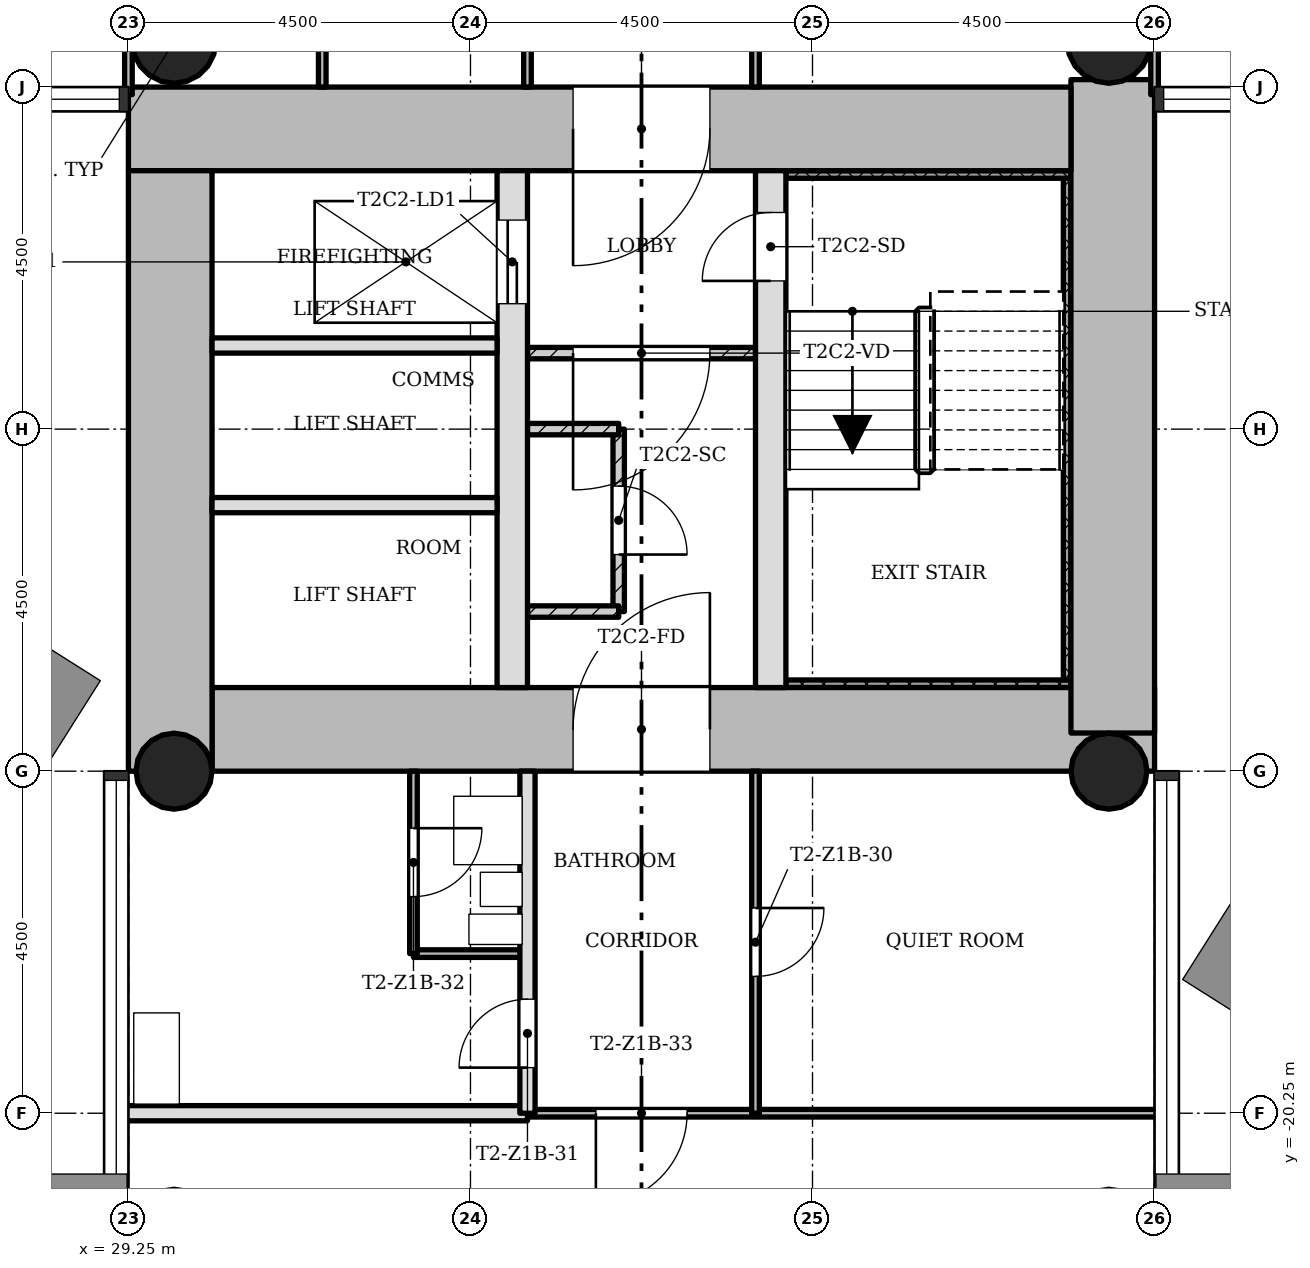
"""IFC4 building model, lengths in metres.
Left out: names, types, materials, properties, quantities, classifications, styles, units other than length and angle.
Written with IfcOpenShell. Run it as: python <this file> out.ifc"""

import sys

from ifc_helpers import new_model, si_unit, direction, frame, frame_2d, origin, origin_2d, place, context, subcontext, project, spatial, rectangle, hollow_circle, extrude, element, fill, save


model = new_model("IFC4")
c1 = context("Model", 3, precision=1e-05, world=origin(), true_north=direction((0.0, 1.0)))
c2 = subcontext(c1, "Body", "Model", "MODEL_VIEW")
j1 = project(units=[si_unit("LENGTHUNIT", "METRE"), si_unit("PLANEANGLEUNIT", "RADIAN")], contexts=[c1])
p1 = place(None, origin())
s1 = spatial("IfcSite", under=j1, at=p1, CompositionType="ELEMENT")
p2 = place(p1, origin())
s2 = spatial("IfcBuilding", under=s1, at=p2, CompositionType="ELEMENT")
p3 = place(p2, frame((0.0, 0.0, 38.1)))
s3 = spatial("IfcBuildingStorey", under=s2, at=p3, CompositionType="ELEMENT", Elevation=38.1)
p4 = place(p3, frame((30.35, -15.2, 0.0), z_axis=(0.0, 0.0, 1.0), x_axis=(1.0, 0.0, 0.0)))
e1 = element("IfcWall", 1, at=p4, inside=s3, PredefinedType="SHEAR", context=c2, shape_type="SweptSolid", body=[
    extrude(rectangle(XDim=12.4, YDim=1.1, at=frame_2d((6.2, 0.0))), origin(), (0.0, 0.0, 1.0), 3.4),
])
p5 = place(p4, frame((4.75, 0.0, 0.0)))
e2 = element("IfcOpeningElement", 2, at=p5, cuts=e1, PredefinedType="OPENING", context=c2, shape_type="SweptSolid", body=[
    extrude(rectangle(XDim=1.8, YDim=2.1, at=frame_2d((0.9, 1.05))), frame((0.0, 0.56, 0.0), z_axis=(0.0, -1.0, 0.0), x_axis=(1.0, 0.0, 0.0)), (0.0, 0.0, 1.0), 1.12),
])
p6 = place(p3, frame((42.2, -15.248, 0.0), z_axis=(0.0, 0.0, 1.0), x_axis=(0.0, 1.0, 0.0)))
e3 = element("IfcWall", 3, at=p6, inside=s3, PredefinedType="SHEAR", context=c2, shape_type="SweptSolid", body=[
    extrude(rectangle(XDim=8.596, YDim=1.1, at=frame_2d((4.298, 0.0))), origin(), (0.0, 0.0, 1.0), 3.4),
])
p7 = place(p3, frame((41.65, -7.3, 0.0), z_axis=(0.0, 0.0, 1.0), x_axis=(-1.0, 0.0, 0.0)))
e4 = element("IfcWall", 4, at=p7, inside=s3, PredefinedType="SHEAR", context=c2, shape_type="SweptSolid", body=[
    extrude(rectangle(XDim=12.4, YDim=1.1, at=frame_2d((6.2, 0.0))), origin(), (0.0, 0.0, 1.0), 3.4),
])
p8 = place(p7, frame((4.75, 0.0, 0.0)))
e5 = element("IfcOpeningElement", 5, at=p8, cuts=e4, PredefinedType="OPENING", context=c2, shape_type="SweptSolid", body=[
    extrude(rectangle(XDim=1.8, YDim=2.1, at=frame_2d((0.9, 1.05))), frame((0.0, 0.56, 0.0), z_axis=(0.0, -1.0, 0.0), x_axis=(1.0, 0.0, 0.0)), (0.0, 0.0, 1.0), 1.12),
])
p9 = place(p3, frame((29.8, -7.85, 0.0), z_axis=(0.0, 0.0, 1.0), x_axis=(0.0, -1.0, 0.0)))
e6 = element("IfcWall", 6, at=p9, inside=s3, PredefinedType="SHEAR", context=c2, shape_type="SweptSolid", body=[
    extrude(rectangle(XDim=7.9, YDim=1.1, at=frame_2d((3.95, 0.0))), origin(), (0.0, 0.0, 1.0), 3.4),
])
p10 = place(p3, frame((34.3, -14.65, 0.0), z_axis=(0.0, 0.0, 1.0), x_axis=(0.0, 1.0, 0.0)))
e7 = element("IfcWall", 7, at=p10, inside=s3, PredefinedType="SHEAR", context=c2, shape_type="SweptSolid", body=[
    extrude(rectangle(XDim=6.8, YDim=0.4, at=frame_2d((3.4, 0.0))), origin(), (0.0, 0.0, 1.0), 3.4),
])
p11 = place(p10, frame((5.05, 0.0, 0.0)))
e8 = element("IfcOpeningElement", 8, at=p11, cuts=e7, PredefinedType="OPENING", context=c2, shape_type="SweptSolid", body=[
    extrude(rectangle(XDim=1.1, YDim=2.1, at=frame_2d((0.55, 1.05))), frame((0.0, 0.21, 0.0), z_axis=(0.0, -1.0, 0.0), x_axis=(1.0, 0.0, 0.0)), (0.0, 0.0, 1.0), 0.42),
])
p12 = place(p3, frame((37.7, -14.65, 0.0), z_axis=(0.0, 0.0, 1.0), x_axis=(0.0, 1.0, 0.0)))
e9 = element("IfcWall", 9, at=p12, inside=s3, PredefinedType="SHEAR", context=c2, shape_type="SweptSolid", body=[
    extrude(rectangle(XDim=6.8, YDim=0.4, at=frame_2d((3.4, 0.0))), origin(), (0.0, 0.0, 1.0), 3.4),
])
p13 = place(p12, frame((5.35, 0.0, 0.0)))
e10 = element("IfcOpeningElement", 10, at=p13, cuts=e9, PredefinedType="OPENING", context=c2, shape_type="SweptSolid", body=[
    extrude(rectangle(XDim=0.9, YDim=2.1, at=frame_2d((0.45, 1.05))), frame((0.0, 0.21, 0.0), z_axis=(0.0, -1.0, 0.0), x_axis=(1.0, 0.0, 0.0)), (0.0, 0.0, 1.0), 0.42),
])
for number, where, z_axis, x_axis in (
    (11, (42.15, -15.75, 0.0), (0.0, 0.0, 1.0), (1.0, 0.0, 0.0)),
    (12, (29.85, -15.75, 0.0), (0.0, 0.0, 1.0), (1.0, 0.0, 0.0)),
):
    element("IfcColumn", number, at=place(p3, frame(where, z_axis=z_axis, x_axis=x_axis)), inside=s3, PredefinedType="COLUMN", context=c2, shape_type="SweptSolid", body=[
        extrude(hollow_circle(Radius=0.5, WallThickness=0.036, at=origin_2d()), origin(), (0.0, 0.0, 1.0), 3.4),
    ])
for number, where, z_axis, x_axis in (
    (13, (42.15, -6.15, 0.0), (0.0, 0.0, 1.0), (1.0, 0.0, 0.0)),
    (14, (29.85, -6.15, 0.0), (0.0, 0.0, 1.0), (1.0, 0.0, 0.0)),
):
    element("IfcColumn", number, at=place(p3, frame(where, z_axis=z_axis, x_axis=x_axis)), inside=s3, PredefinedType="COLUMN", context=c2, shape_type="SweptSolid", body=[
        extrude(hollow_circle(Radius=0.55, WallThickness=0.04, at=origin_2d()), origin(), (0.0, 0.0, 1.0), 3.4),
    ])
p14 = place(p3, frame((34.5, -10.25, 0.0), z_axis=(0.0, 0.0, 1.0), x_axis=(1.0, 0.0, 0.0)))
e15 = element("IfcWall", 15, at=p14, inside=s3, PredefinedType="PARTITIONING", context=c2, shape_type="SweptSolid", body=[
    extrude(rectangle(XDim=3.0, YDim=0.15, at=frame_2d((1.5, 0.0))), origin(), (0.0, 0.0, 1.0), 3.0),
])
p15 = place(p14, frame((0.6, 0.0, 0.0)))
e16 = element("IfcOpeningElement", 16, at=p15, cuts=e15, PredefinedType="OPENING", context=c2, shape_type="SweptSolid", body=[
    extrude(rectangle(XDim=1.8, YDim=2.1, at=frame_2d((0.9, 1.05))), frame((0.0, 0.085, 0.0), z_axis=(0.0, -1.0, 0.0), x_axis=(1.0, 0.0, 0.0)), (0.0, 0.0, 1.0), 0.17),
])
for number, where, z_axis, x_axis in (
    (17, (30.35, -10.15, 0.0), (0.0, 0.0, 1.0), (1.0, 0.0, 0.0)),
    (18, (30.35, -12.25, 0.0), (0.0, 0.0, 1.0), (1.0, 0.0, 0.0)),
):
    element("IfcWall", number, at=place(p3, frame(where, z_axis=z_axis, x_axis=x_axis)), inside=s3, PredefinedType="SOLIDWALL", context=c2, shape_type="SweptSolid", body=[
        extrude(rectangle(XDim=3.75, YDim=0.2, at=frame_2d((1.875, 0.0))), origin(), (0.0, 0.0, 1.0), 3.0),
    ])
p16 = place(p3, frame((35.7, -11.25, 0.0), z_axis=(0.0, 0.0, 1.0), x_axis=(0.0, -1.0, 0.0)))
e19 = element("IfcWall", 19, at=p16, inside=s3, PredefinedType="PARTITIONING", context=c2, shape_type="SweptSolid", body=[
    extrude(rectangle(XDim=2.4, YDim=0.15, at=frame_2d((1.2, 0.0))), origin(), (0.0, 0.0, 1.0), 3.0),
])
p17 = place(p16, frame((0.75, 0.0, 0.0)))
e20 = element("IfcOpeningElement", 20, at=p17, cuts=e19, PredefinedType="OPENING", context=c2, shape_type="SweptSolid", body=[
    extrude(rectangle(XDim=0.9, YDim=2.1, at=frame_2d((0.45, 1.05))), frame((0.0, 0.085, 0.0), z_axis=(0.0, -1.0, 0.0), x_axis=(1.0, 0.0, 0.0)), (0.0, 0.0, 1.0), 0.17),
])
for number, where, z_axis, x_axis in (
    (21, (35.7, -11.25, 0.0), (0.0, 0.0, 1.0), (-1.0, 0.0, 0.0)),
    (22, (35.7, -13.65, 0.0), (0.0, 0.0, 1.0), (-1.0, 0.0, 0.0)),
):
    element("IfcWall", number, at=place(p3, frame(where, z_axis=z_axis, x_axis=x_axis)), inside=s3, PredefinedType="PARTITIONING", context=c2, shape_type="SweptSolid", body=[
        extrude(rectangle(XDim=1.2, YDim=0.15, at=frame_2d((0.6, 0.0))), origin(), (0.0, 0.0, 1.0), 3.0),
    ])
p18 = place(p3, frame((42.85, -20.25, 0.0), z_axis=(0.0, 0.0, 1.0), x_axis=(-1.0, 0.0, 0.0)))
e23 = element("IfcWall", 23, at=p18, inside=s3, PredefinedType="PARTITIONING", context=c2, shape_type="SweptSolid", body=[
    extrude(rectangle(XDim=8.35, YDim=0.1, at=frame_2d((4.175, 0.0))), origin(), (0.0, 0.0, 1.0), 3.0),
])
p19 = place(p18, frame((6.25, 0.0, 0.0)))
e24 = element("IfcOpeningElement", 24, at=p19, cuts=e23, PredefinedType="OPENING", context=c2, shape_type="SweptSolid", body=[
    extrude(rectangle(XDim=1.2, YDim=2.1, at=frame_2d((0.6, 1.05))), frame((0.0, 0.06, 0.0), z_axis=(0.0, -1.0, 0.0), x_axis=(1.0, 0.0, 0.0)), (0.0, 0.0, 1.0), 0.12),
])
p20 = place(p3, frame((34.5, -20.25, 0.0), z_axis=(0.0, 0.0, 1.0), x_axis=(-1.0, 0.0, 0.0)))
e25 = element("IfcWall", 25, at=p20, inside=s3, PredefinedType="SOLIDWALL", context=c2, shape_type="SweptSolid", body=[
    extrude(rectangle(XDim=5.35, YDim=0.2, at=frame_2d((2.675, 0.0))), origin(), (0.0, 0.0, 1.0), 3.0),
])
p21 = place(p3, frame((34.5, -18.15, 0.0), z_axis=(0.0, 0.0, 1.0), x_axis=(-1.0, 0.0, 0.0)))
e26 = element("IfcWall", 26, at=p21, inside=s3, PredefinedType="PARTITIONING", context=c2, shape_type="SweptSolid", body=[
    extrude(rectangle(XDim=1.5, YDim=0.1, at=frame_2d((0.75, 0.0))), origin(), (0.0, 0.0, 1.0), 3.0),
])
p22 = place(p3, frame((42.75, -6.85, 0.0), z_axis=(0.0, 0.0, 1.0), x_axis=(0.0, 1.0, 0.0)))
e27 = element("IfcWall", 27, at=p22, inside=s3, PredefinedType="PARTITIONING", context=c2, shape_type="SweptSolid", body=[
    extrude(rectangle(XDim=5.95, YDim=0.1, at=frame_2d((2.975, 0.0))), origin(), (0.0, 0.0, 1.0), 3.0),
])
p23 = place(p3, frame((37.5, -20.25, 0.0), z_axis=(0.0, 0.0, 1.0), x_axis=(0.0, 1.0, 0.0)))
e28 = element("IfcWall", 28, at=p23, inside=s3, PredefinedType="PARTITIONING", context=c2, shape_type="SweptSolid", body=[
    extrude(rectangle(XDim=4.5, YDim=0.1, at=frame_2d((2.25, 0.0))), origin(), (0.0, 0.0, 1.0), 3.0),
])
p24 = place(p23, frame((1.8, 0.0, 0.0)))
e29 = element("IfcOpeningElement", 29, at=p24, cuts=e28, PredefinedType="OPENING", context=c2, shape_type="SweptSolid", body=[
    extrude(rectangle(XDim=0.9, YDim=2.1, at=frame_2d((0.45, 1.05))), frame((0.0, 0.06, 0.0), z_axis=(0.0, -1.0, 0.0), x_axis=(1.0, 0.0, 0.0)), (0.0, 0.0, 1.0), 0.12),
])
p25 = place(p3, frame((37.5, -6.75, 0.0), z_axis=(0.0, 0.0, 1.0), x_axis=(0.0, 1.0, 0.0)))
e30 = element("IfcWall", 30, at=p25, inside=s3, PredefinedType="PARTITIONING", context=c2, shape_type="SweptSolid", body=[
    extrude(rectangle(XDim=5.85, YDim=0.1, at=frame_2d((2.925, 0.0))), origin(), (0.0, 0.0, 1.0), 3.0),
])
p26 = place(p25, frame((1.575, 0.0, 0.0)))
e31 = element("IfcOpeningElement", 31, at=p26, cuts=e30, PredefinedType="OPENING", context=c2, shape_type="SweptSolid", body=[
    extrude(rectangle(XDim=0.9, YDim=2.1, at=frame_2d((0.45, 1.05))), frame((0.0, 0.06, 0.0), z_axis=(0.0, -1.0, 0.0), x_axis=(1.0, 0.0, 0.0)), (0.0, 0.0, 1.0), 0.12),
])
p27 = place(p3, frame((34.5, -6.75, 0.0), z_axis=(0.0, 0.0, 1.0), x_axis=(0.0, 1.0, 0.0)))
e32 = element("IfcWall", 32, at=p27, inside=s3, PredefinedType="PARTITIONING", context=c2, shape_type="SweptSolid", body=[
    extrude(rectangle(XDim=5.85, YDim=0.1, at=frame_2d((2.925, 0.0))), origin(), (0.0, 0.0, 1.0), 3.0),
])
p28 = place(p27, frame((2.475, 0.0, 0.0)))
e33 = element("IfcOpeningElement", 33, at=p28, cuts=e32, PredefinedType="OPENING", context=c2, shape_type="SweptSolid", body=[
    extrude(rectangle(XDim=0.9, YDim=2.1, at=frame_2d((0.45, 1.05))), frame((0.0, 0.06, 0.0), z_axis=(0.0, -1.0, 0.0), x_axis=(1.0, 0.0, 0.0)), (0.0, 0.0, 1.0), 0.12),
])
p29 = place(p3, frame((34.5, -20.25, 0.0), z_axis=(0.0, 0.0, 1.0), x_axis=(0.0, 1.0, 0.0)))
e34 = element("IfcWall", 34, at=p29, inside=s3, PredefinedType="SOLIDWALL", context=c2, shape_type="SweptSolid", body=[
    extrude(rectangle(XDim=4.5, YDim=0.2, at=frame_2d((2.25, 0.0))), origin(), (0.0, 0.0, 1.0), 3.0),
])
p30 = place(p29, frame((0.6, 0.0, 0.0)))
e35 = element("IfcOpeningElement", 35, at=p30, cuts=e34, PredefinedType="OPENING", context=c2, shape_type="SweptSolid", body=[
    extrude(rectangle(XDim=0.9, YDim=2.1, at=frame_2d((0.45, 1.05))), frame((0.0, 0.11, 0.0), z_axis=(0.0, -1.0, 0.0), x_axis=(1.0, 0.0, 0.0)), (0.0, 0.0, 1.0), 0.22),
])
p31 = place(p3, frame((33.0, -18.15, 0.0), z_axis=(0.0, 0.0, 1.0), x_axis=(0.0, 1.0, 0.0)))
e36 = element("IfcWall", 36, at=p31, inside=s3, PredefinedType="PARTITIONING", context=c2, shape_type="SweptSolid", body=[
    extrude(rectangle(XDim=2.4, YDim=0.1, at=frame_2d((1.2, 0.0))), origin(), (0.0, 0.0, 1.0), 3.0),
])
p32 = place(p31, frame((0.75, 0.0, 0.0)))
e37 = element("IfcOpeningElement", 37, at=p32, cuts=e36, PredefinedType="OPENING", context=c2, shape_type="SweptSolid", body=[
    extrude(rectangle(XDim=0.9, YDim=2.1, at=frame_2d((0.45, 1.05))), frame((0.0, 0.06, 0.0), z_axis=(0.0, -1.0, 0.0), x_axis=(1.0, 0.0, 0.0)), (0.0, 0.0, 1.0), 0.12),
])
p33 = place(p3, frame((31.8, -6.75, 0.0), z_axis=(0.0, 0.0, 1.0), x_axis=(0.0, 1.0, 0.0)))
e38 = element("IfcWall", 38, at=p33, inside=s3, PredefinedType="PARTITIONING", context=c2, shape_type="SweptSolid", body=[
    extrude(rectangle(XDim=5.85, YDim=0.1, at=frame_2d((2.925, 0.0))), origin(), (0.0, 0.0, 1.0), 3.0),
])
p34 = place(p3, frame((29.25, -6.85, 0.0), z_axis=(0.0, 0.0, 1.0), x_axis=(0.0, 1.0, 0.0)))
e39 = element("IfcWall", 39, at=p34, inside=s3, PredefinedType="PARTITIONING", context=c2, shape_type="SweptSolid", body=[
    extrude(rectangle(XDim=5.95, YDim=0.1, at=frame_2d((2.975, 0.0))), origin(), (0.0, 0.0, 1.0), 3.0),
])
p35 = place(p3, frame((37.9, -14.6, 0.0), z_axis=(0.0, 0.0, 1.0), x_axis=(1.0, 0.0, 0.0)))
e40 = element("IfcWall", 40, at=p35, inside=s3, PredefinedType="SHEAR", context=c2, shape_type="SweptSolid", body=[
    extrude(rectangle(XDim=3.75, YDim=0.1, at=frame_2d((1.875, 0.0))), origin(), (0.0, 0.0, 1.0), 3.4),
])
p36 = place(p3, frame((41.6, -7.95, 0.0), z_axis=(0.0, 0.0, 1.0), x_axis=(0.0, -1.0, 0.0)))
e41 = element("IfcWall", 41, at=p36, inside=s3, PredefinedType="SHEAR", context=c2, shape_type="SweptSolid", body=[
    extrude(rectangle(XDim=6.6, YDim=0.1, at=frame_2d((3.3, 0.0))), origin(), (0.0, 0.0, 1.0), 3.4),
])
p37 = place(p3, frame((37.9, -7.9, 0.0), z_axis=(0.0, 0.0, 1.0), x_axis=(1.0, 0.0, 0.0)))
e42 = element("IfcWall", 42, at=p37, inside=s3, PredefinedType="SHEAR", context=c2, shape_type="SweptSolid", body=[
    extrude(rectangle(XDim=3.75, YDim=0.1, at=frame_2d((1.875, 0.0))), origin(), (0.0, 0.0, 1.0), 3.4),
])
p38 = place(p15, origin())
e43 = element("IfcDoor", 43, at=p38, inside=s3, OperationType="SINGLE_SWING_LEFT", PredefinedType="DOOR", context=c2, shape_type="SweptSolid", body=[
    extrude(rectangle(XDim=1.8, YDim=2.1, at=frame_2d((0.9, 1.05))), frame((0.0, 0.025, 0.0), z_axis=(0.0, -1.0, 0.0), x_axis=(1.0, 0.0, 0.0)), (0.0, 0.0, 1.0), 0.05),
])
fill(e16, e43)
p39 = place(p17, origin())
e44 = element("IfcDoor", 44, at=p39, inside=s3, OperationType="SINGLE_SWING_LEFT", PredefinedType="DOOR", context=c2, shape_type="SweptSolid", body=[
    extrude(rectangle(XDim=0.9, YDim=2.1, at=frame_2d((0.45, 1.05))), frame((0.0, 0.025, 0.0), z_axis=(0.0, -1.0, 0.0), x_axis=(1.0, 0.0, 0.0)), (0.0, 0.0, 1.0), 0.05),
])
fill(e20, e44)
p40 = place(p24, origin())
e45 = element("IfcDoor", 45, at=p40, inside=s3, OperationType="SINGLE_SWING_RIGHT", PredefinedType="DOOR", context=c2, shape_type="SweptSolid", body=[
    extrude(rectangle(XDim=0.9, YDim=2.1, at=frame_2d((0.45, 1.05))), frame((0.0, 0.025, 0.0), z_axis=(0.0, -1.0, 0.0), x_axis=(1.0, 0.0, 0.0)), (0.0, 0.0, 1.0), 0.05),
])
fill(e29, e45)
p41 = place(p30, origin())
e46 = element("IfcDoor", 46, at=p41, inside=s3, OperationType="SINGLE_SWING_RIGHT", PredefinedType="DOOR", context=c2, shape_type="SweptSolid", body=[
    extrude(rectangle(XDim=0.9, YDim=2.1, at=frame_2d((0.45, 1.05))), frame((0.0, 0.025, 0.0), z_axis=(0.0, -1.0, 0.0), x_axis=(1.0, 0.0, 0.0)), (0.0, 0.0, 1.0), 0.05),
])
fill(e35, e46)
p42 = place(p32, origin())
e47 = element("IfcDoor", 47, at=p42, inside=s3, OperationType="SINGLE_SWING_RIGHT", PredefinedType="DOOR", context=c2, shape_type="SweptSolid", body=[
    extrude(rectangle(XDim=0.9, YDim=2.1, at=frame_2d((0.45, 1.05))), frame((0.0, 0.025, 0.0), z_axis=(0.0, -1.0, 0.0), x_axis=(1.0, 0.0, 0.0)), (0.0, 0.0, 1.0), 0.05),
])
fill(e37, e47)
p43 = place(p19, origin())
e48 = element("IfcDoor", 48, at=p43, inside=s3, OperationType="SINGLE_SWING_LEFT", PredefinedType="DOOR", context=c2, shape_type="SweptSolid", body=[
    extrude(rectangle(XDim=1.2, YDim=2.1, at=frame_2d((0.6, 1.05))), frame((0.0, 0.025, 0.0), z_axis=(0.0, -1.0, 0.0), x_axis=(1.0, 0.0, 0.0)), (0.0, 0.0, 1.0), 0.05),
])
fill(e24, e48)
p44 = place(p13, origin())
e49 = element("IfcDoor", 49, at=p44, inside=s3, OperationType="SINGLE_SWING_RIGHT", PredefinedType="DOOR", context=c2, shape_type="SweptSolid", body=[
    extrude(rectangle(XDim=0.9, YDim=2.1, at=frame_2d((0.45, 1.05))), frame((0.0, 0.025, 0.0), z_axis=(0.0, -1.0, 0.0), x_axis=(1.0, 0.0, 0.0)), (0.0, 0.0, 1.0), 0.05),
])
fill(e10, e49)
p45 = place(p11, origin())
e50 = element("IfcDoor", 50, at=p45, inside=s3, OperationType="SLIDING_TO_LEFT", PredefinedType="DOOR", context=c2, shape_type="SweptSolid", body=[
    extrude(rectangle(XDim=1.1, YDim=2.1, at=frame_2d((0.55, 1.05))), frame((0.0, 0.025, 0.0), z_axis=(0.0, -1.0, 0.0), x_axis=(1.0, 0.0, 0.0)), (0.0, 0.0, 1.0), 0.05),
])
fill(e8, e50)
p46 = place(p8, origin())
e51 = element("IfcDoor", 51, at=p46, inside=s3, OperationType="SINGLE_SWING_LEFT", PredefinedType="DOOR", context=c2, shape_type="SweptSolid", body=[
    extrude(rectangle(XDim=1.8, YDim=2.1, at=frame_2d((0.9, 1.05))), frame((0.0, 0.025, 0.0), z_axis=(0.0, -1.0, 0.0), x_axis=(1.0, 0.0, 0.0)), (0.0, 0.0, 1.0), 0.05),
])
fill(e5, e51)
p47 = place(p5, origin())
e52 = element("IfcDoor", 52, at=p47, inside=s3, OperationType="SINGLE_SWING_LEFT", PredefinedType="DOOR", context=c2, shape_type="SweptSolid", body=[
    extrude(rectangle(XDim=1.8, YDim=2.1, at=frame_2d((0.9, 1.05))), frame((0.0, 0.025, 0.0), z_axis=(0.0, -1.0, 0.0), x_axis=(1.0, 0.0, 0.0)), (0.0, 0.0, 1.0), 0.05),
])
fill(e2, e52)
save(model, sys.argv[1])
